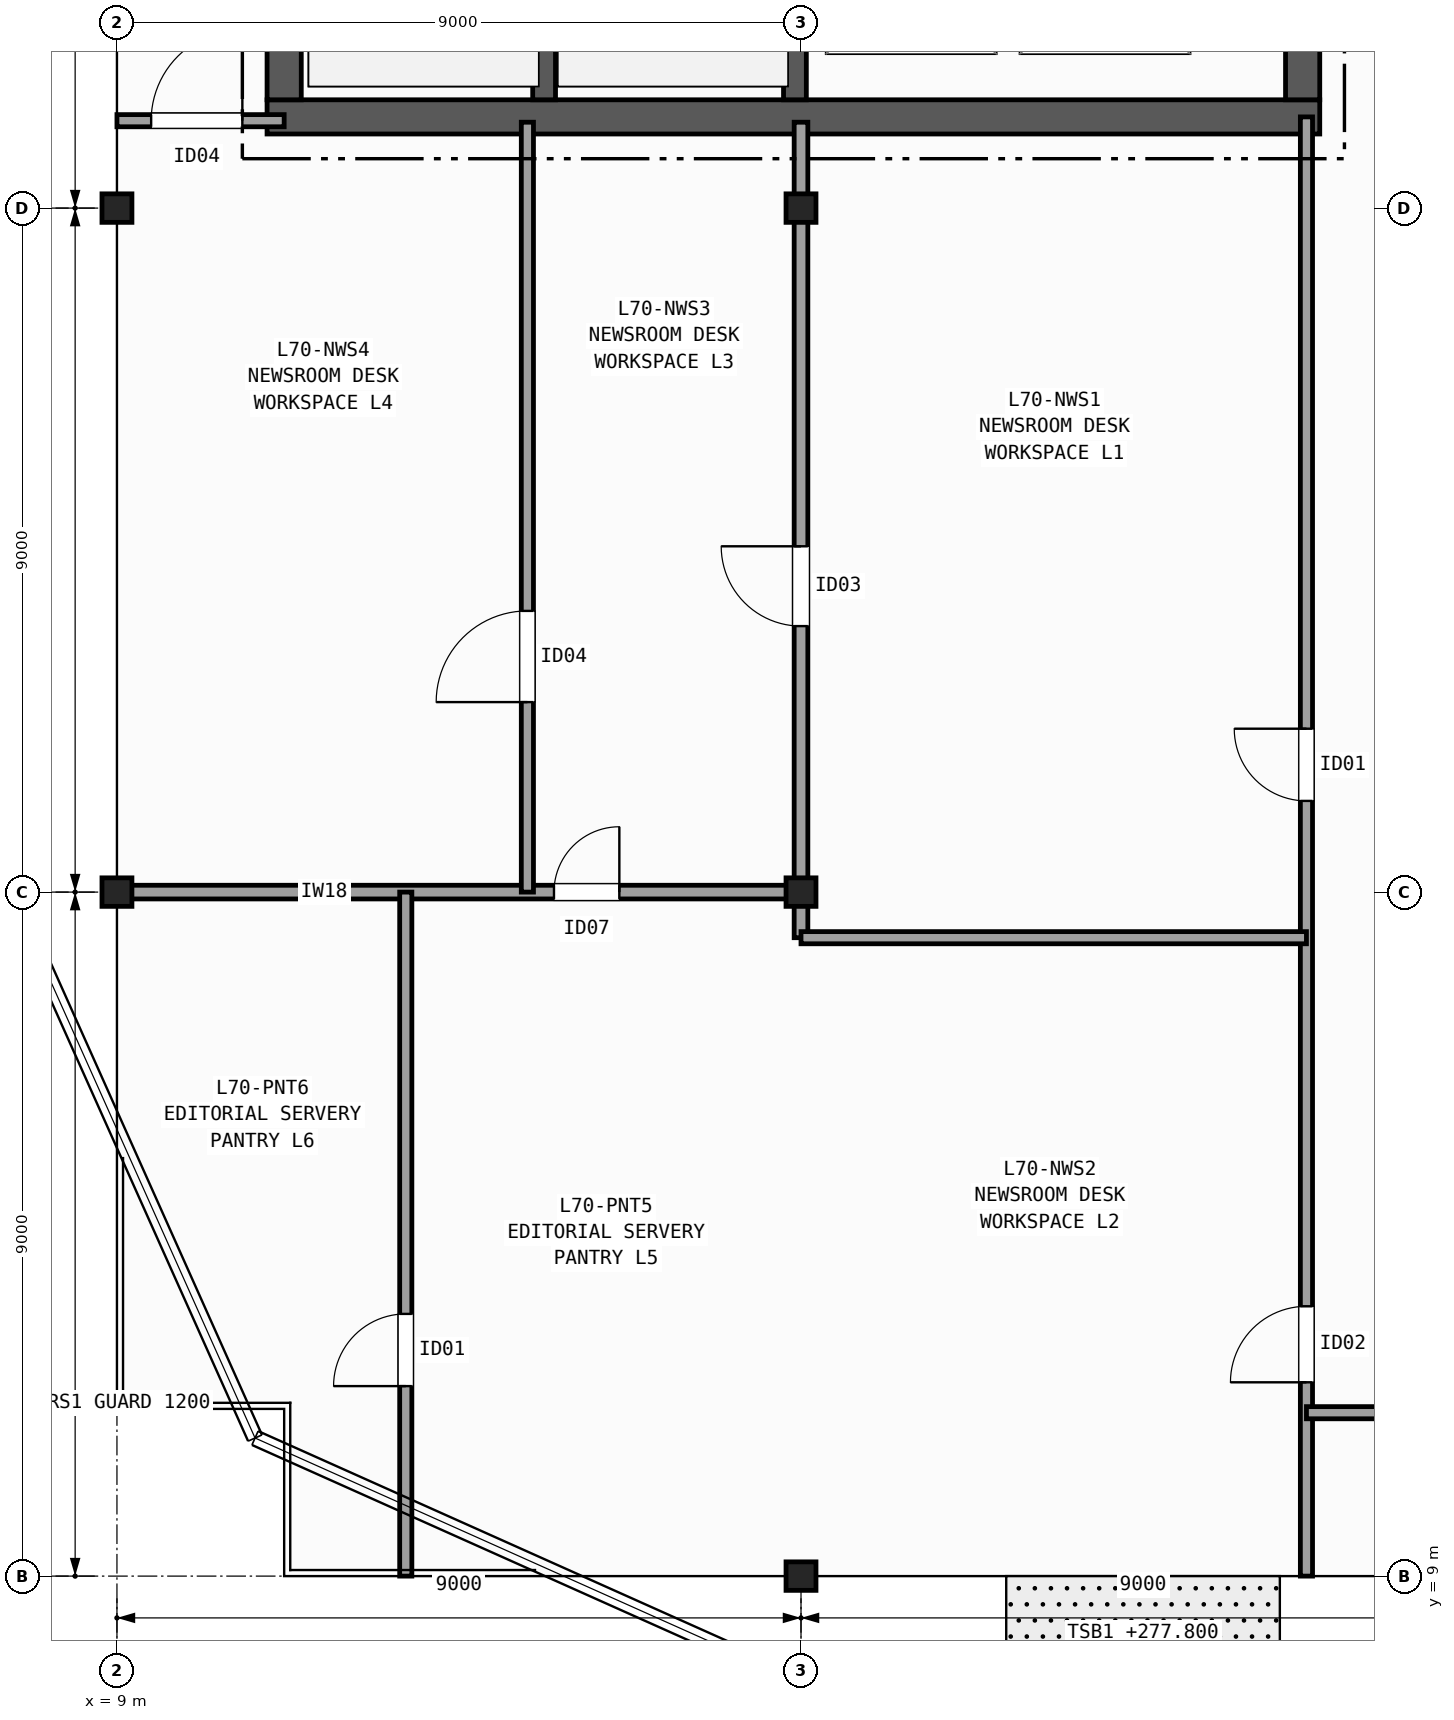
"""IFC4 building model, lengths in metres.
Left out: names, types, materials, properties, quantities, classifications, styles, units other than length and angle.
Written with IfcOpenShell. Run it as: python <this file> out.ifc"""

import sys

from ifc_helpers import new_model, si_unit, direction, frame, frame_2d, origin, origin_2d, place, context, subcontext, project, spatial, rectangle, i_section, extrude, element, fill, save


model = new_model("IFC4")
c1 = context("Model", 3, precision=1e-05, world=origin(), true_north=direction((0.0, 1.0)))
c2 = subcontext(c1, "Body", "Model", "MODEL_VIEW")
j1 = project(units=[si_unit("LENGTHUNIT", "METRE"), si_unit("PLANEANGLEUNIT", "RADIAN")], contexts=[c1])
p1 = place(None, origin())
s1 = spatial("IfcSite", under=j1, at=p1, CompositionType="ELEMENT")
p2 = place(p1, origin())
s2 = spatial("IfcBuilding", under=s1, at=p2, CompositionType="ELEMENT")
p3 = place(p2, frame((0.0, 0.0, 277.8)))
s3 = spatial("IfcBuildingStorey", under=s2, at=p3, CompositionType="ELEMENT", Elevation=277.8)
for number, where, z_axis, x_axis in (
    (1, (9.0, 18.0, 0.0), (0.0, 0.0, 1.0), (1.0, 0.0, 0.0)),
    (2, (9.0, 27.0, 0.0), (0.0, 0.0, 1.0), (1.0, 0.0, 0.0)),
    (3, (18.0, 9.0, 0.0), (0.0, 0.0, 1.0), (1.0, 0.0, 0.0)),
    (4, (18.0, 18.0, 0.0), (0.0, 0.0, 1.0), (1.0, 0.0, 0.0)),
    (5, (18.0, 27.0, 0.0), (0.0, 0.0, 1.0), (1.0, 0.0, 0.0)),
):
    element("IfcColumn", number, at=place(p3, frame(where, z_axis=z_axis, x_axis=x_axis)), inside=s3, PredefinedType="COLUMN", context=c2, shape_type="SweptSolid", body=[
        extrude(i_section(OverallWidth=0.394, OverallDepth=0.375, WebThickness=0.017, FlangeThickness=0.028, FilletRadius=0.015, at=origin_2d()), origin(), (0.0, 0.0, 1.0), 3.7),
    ])
p4 = place(p3, frame((10.975, 28.2, 0.0), z_axis=(0.0, 0.0, 1.0), x_axis=(1.0, 0.0, 0.0)))
e6 = element("IfcWall", 6, at=p4, inside=s3, PredefinedType="SHEAR", context=c2, shape_type="SweptSolid", body=[
    extrude(rectangle(XDim=13.85, YDim=0.45, at=frame_2d((6.925, 0.0))), origin(), (0.0, 0.0, 1.0), 3.42),
])
p5 = place(p3, frame((11.2, 42.175, 0.0), z_axis=(0.0, 0.0, 1.0), x_axis=(0.0, -1.0, 0.0)))
e7 = element("IfcWall", 7, at=p5, inside=s3, PredefinedType="SHEAR", context=c2, shape_type="SweptSolid", body=[
    extrude(rectangle(XDim=13.75, YDim=0.45, at=frame_2d((6.875, 0.0))), origin(), (0.0, 0.0, 1.0), 3.42),
])
p6 = place(p3, frame((24.6, 28.425, 0.0), z_axis=(0.0, 0.0, 1.0), x_axis=(0.0, 1.0, 0.0)))
e8 = element("IfcWall", 8, at=p6, inside=s3, PredefinedType="SHEAR", context=c2, shape_type="SweptSolid", body=[
    extrude(rectangle(XDim=13.75, YDim=0.45, at=frame_2d((6.875, 0.0))), origin(), (0.0, 0.0, 1.0), 3.42),
])
p7 = place(p6, frame((3.375, 0.0, 0.0)))
e9 = element("IfcOpeningElement", 9, at=p7, cuts=e8, PredefinedType="OPENING", context=c2, shape_type="SweptSolid", body=[
    extrude(rectangle(XDim=1.5, YDim=2.2, at=frame_2d((0.75, 1.1))), frame((0.0, 0.235, 0.0), z_axis=(0.0, -1.0, 0.0), x_axis=(1.0, 0.0, 0.0)), (0.0, 0.0, 1.0), 0.47),
])
p8 = place(p6, frame((9.975, 0.0, 0.0)))
e10 = element("IfcOpeningElement", 10, at=p8, cuts=e8, PredefinedType="OPENING", context=c2, shape_type="SweptSolid", body=[
    extrude(rectangle(XDim=0.9, YDim=2.1, at=frame_2d((0.45, 1.05))), frame((0.0, 0.235, 0.0), z_axis=(0.0, -1.0, 0.0), x_axis=(1.0, 0.0, 0.0)), (0.0, 0.0, 1.0), 0.47),
])
p9 = place(p6, frame((12.075, 0.0, 0.0)))
e11 = element("IfcOpeningElement", 11, at=p9, cuts=e8, PredefinedType="OPENING", context=c2, shape_type="SweptSolid", body=[
    extrude(rectangle(XDim=0.9, YDim=2.1, at=frame_2d((0.45, 1.05))), frame((0.0, 0.235, 0.0), z_axis=(0.0, -1.0, 0.0), x_axis=(1.0, 0.0, 0.0)), (0.0, 0.0, 1.0), 0.47),
])
p10 = place(p3, frame((14.62, 28.425, 0.0), z_axis=(0.0, 0.0, 1.0), x_axis=(0.0, 1.0, 0.0)))
e12 = element("IfcWall", 12, at=p10, inside=s3, PredefinedType="SHEAR", context=c2, shape_type="SweptSolid", body=[
    extrude(rectangle(XDim=9.025, YDim=0.3, at=frame_2d((4.512, 0.0))), origin(), (0.0, 0.0, 1.0), 3.42),
])
p11 = place(p3, frame((17.92, 42.175, 0.0), z_axis=(0.0, 0.0, 1.0), x_axis=(0.0, -1.0, 0.0)))
e13 = element("IfcWall", 13, at=p11, inside=s3, PredefinedType="SHEAR", context=c2, shape_type="SweptSolid", body=[
    extrude(rectangle(XDim=13.75, YDim=0.3, at=frame_2d((6.875, 0.0))), origin(), (0.0, 0.0, 1.0), 3.42),
])
p12 = place(p11, frame((2.0, 0.0, 0.0)))
e14 = element("IfcOpeningElement", 14, at=p12, cuts=e13, PredefinedType="OPENING", context=c2, shape_type="SweptSolid", body=[
    extrude(rectangle(XDim=1.15, YDim=2.15, at=frame_2d((0.575, 1.075))), frame((0.0, 0.16, 0.0), z_axis=(0.0, -1.0, 0.0), x_axis=(1.0, 0.0, 0.0)), (0.0, 0.0, 1.0), 0.32),
])
p13 = place(p3, frame((9.0, 28.15, 0.0), z_axis=(0.0, 0.0, 1.0), x_axis=(1.0, 0.0, 0.0)))
e15 = element("IfcWall", 15, at=p13, inside=s3, PredefinedType="PARTITIONING", context=c2, shape_type="SweptSolid", body=[
    extrude(rectangle(XDim=2.2, YDim=0.16, at=frame_2d((1.1, 0.0))), origin(), (0.0, 0.0, 1.0), 2.707),
])
p14 = place(p13, frame((0.45, 0.0, 0.0)))
e16 = element("IfcOpeningElement", 16, at=p14, cuts=e15, PredefinedType="OPENING", context=c2, shape_type="SweptSolid", body=[
    extrude(rectangle(XDim=1.2, YDim=2.15, at=frame_2d((0.6, 1.075))), frame((0.0, 0.09, 0.0), z_axis=(0.0, -1.0, 0.0), x_axis=(1.0, 0.0, 0.0)), (0.0, 0.0, 1.0), 0.18),
])
p15 = place(p3, frame((24.65, 9.0, 0.0), z_axis=(0.0, 0.0, 1.0), x_axis=(0.0, 1.0, 0.0)))
e17 = element("IfcWall", 17, at=p15, inside=s3, PredefinedType="PARTITIONING", context=c2, shape_type="SweptSolid", body=[
    extrude(rectangle(XDim=19.2, YDim=0.16, at=frame_2d((9.6, 0.0))), origin(), (0.0, 0.0, 1.0), 2.707),
])
p16 = place(p15, frame((10.2, 0.0, 0.0)))
e18 = element("IfcOpeningElement", 18, at=p16, cuts=e17, PredefinedType="OPENING", context=c2, shape_type="SweptSolid", body=[
    extrude(rectangle(XDim=0.95, YDim=2.1, at=frame_2d((0.475, 1.05))), frame((0.0, 0.09, 0.0), z_axis=(0.0, -1.0, 0.0), x_axis=(1.0, 0.0, 0.0)), (0.0, 0.0, 1.0), 0.18),
])
p17 = place(p15, frame((2.55, 0.0, 0.0)))
e19 = element("IfcOpeningElement", 19, at=p17, cuts=e17, PredefinedType="OPENING", context=c2, shape_type="SweptSolid", body=[
    extrude(rectangle(XDim=1.0, YDim=2.1, at=frame_2d((0.5, 1.05))), frame((0.0, 0.09, 0.0), z_axis=(0.0, -1.0, 0.0), x_axis=(1.0, 0.0, 0.0)), (0.0, 0.0, 1.0), 0.18),
])
p18 = place(p3, frame((9.0, 18.0, 0.0), z_axis=(0.0, 0.0, 1.0), x_axis=(1.0, 0.0, 0.0)))
e20 = element("IfcWall", 20, at=p18, inside=s3, PredefinedType="PARTITIONING", context=c2, shape_type="SweptSolid", body=[
    extrude(rectangle(XDim=9.08, YDim=0.18, at=frame_2d((4.54, 0.0))), origin(), (0.0, 0.0, 1.0), 2.707),
])
p19 = place(p18, frame((5.75, 0.0, 0.0)))
e21 = element("IfcOpeningElement", 21, at=p19, cuts=e20, PredefinedType="OPENING", context=c2, shape_type="SweptSolid", body=[
    extrude(rectangle(XDim=0.86, YDim=2.05, at=frame_2d((0.43, 1.025))), frame((0.0, 0.1, 0.0), z_axis=(0.0, -1.0, 0.0), x_axis=(1.0, 0.0, 0.0)), (0.0, 0.0, 1.0), 0.2),
])
p20 = place(p3, frame((18.0, 17.4, 0.0), z_axis=(0.0, 0.0, 1.0), x_axis=(0.0, 1.0, 0.0)))
e22 = element("IfcWall", 22, at=p20, inside=s3, PredefinedType="PARTITIONING", context=c2, shape_type="SweptSolid", body=[
    extrude(rectangle(XDim=10.73, YDim=0.18, at=frame_2d((5.365, 0.0))), origin(), (0.0, 0.0, 1.0), 2.789),
])
p21 = place(p20, frame((4.1, 0.0, 0.0)))
e23 = element("IfcOpeningElement", 23, at=p21, cuts=e22, PredefinedType="OPENING", context=c2, shape_type="SweptSolid", body=[
    extrude(rectangle(XDim=1.05, YDim=2.15, at=frame_2d((0.525, 1.075))), frame((0.0, 0.1, 0.0), z_axis=(0.0, -1.0, 0.0), x_axis=(1.0, 0.0, 0.0)), (0.0, 0.0, 1.0), 0.2),
])
p22 = place(p3, frame((18.0, 17.4, 0.0), z_axis=(0.0, 0.0, 1.0), x_axis=(1.0, 0.0, 0.0)))
e24 = element("IfcWall", 24, at=p22, inside=s3, PredefinedType="PARTITIONING", context=c2, shape_type="SweptSolid", body=[
    extrude(rectangle(XDim=6.65, YDim=0.16, at=frame_2d((3.325, 0.0))), origin(), (0.0, 0.0, 1.0), 2.792),
])
p23 = place(p3, frame((14.4, 18.0, 0.0), z_axis=(0.0, 0.0, 1.0), x_axis=(0.0, 1.0, 0.0)))
e25 = element("IfcWall", 25, at=p23, inside=s3, PredefinedType="PARTITIONING", context=c2, shape_type="SweptSolid", body=[
    extrude(rectangle(XDim=10.13, YDim=0.16, at=frame_2d((5.065, 0.0))), origin(), (0.0, 0.0, 1.0), 2.789),
])
p24 = place(p23, frame((2.5, 0.0, 0.0)))
e26 = element("IfcOpeningElement", 26, at=p24, cuts=e25, PredefinedType="OPENING", context=c2, shape_type="SweptSolid", body=[
    extrude(rectangle(XDim=1.2, YDim=2.15, at=frame_2d((0.6, 1.075))), frame((0.0, 0.09, 0.0), z_axis=(0.0, -1.0, 0.0), x_axis=(1.0, 0.0, 0.0)), (0.0, 0.0, 1.0), 0.18),
])
p25 = place(p3, frame((12.8, 9.0, 0.0), z_axis=(0.0, 0.0, 1.0), x_axis=(0.0, 1.0, 0.0)))
e27 = element("IfcWall", 27, at=p25, inside=s3, PredefinedType="PARTITIONING", context=c2, shape_type="SweptSolid", body=[
    extrude(rectangle(XDim=9.0, YDim=0.16, at=frame_2d((4.5, 0.0))), origin(), (0.0, 0.0, 1.0), 2.789),
])
p26 = place(p25, frame((2.5, 0.0, 0.0)))
e28 = element("IfcOpeningElement", 28, at=p26, cuts=e27, PredefinedType="OPENING", context=c2, shape_type="SweptSolid", body=[
    extrude(rectangle(XDim=0.95, YDim=2.1, at=frame_2d((0.475, 1.05))), frame((0.0, 0.09, 0.0), z_axis=(0.0, -1.0, 0.0), x_axis=(1.0, 0.0, 0.0)), (0.0, 0.0, 1.0), 0.18),
])
p27 = place(p3, frame((24.65, 11.15, 0.0), z_axis=(0.0, 0.0, 1.0), x_axis=(1.0, 0.0, 0.0)))
e29 = element("IfcWall", 29, at=p27, inside=s3, PredefinedType="PARTITIONING", context=c2, shape_type="SweptSolid", body=[
    extrude(rectangle(XDim=4.75, YDim=0.16, at=frame_2d((2.375, 0.0))), origin(), (0.0, 0.0, 1.0), 2.792),
])
p28 = place(p27, frame((1.2, 0.0, 0.0)))
e30 = element("IfcOpeningElement", 30, at=p28, cuts=e29, PredefinedType="OPENING", context=c2, shape_type="SweptSolid", body=[
    extrude(rectangle(XDim=1.0, YDim=2.1, at=frame_2d((0.5, 1.05))), frame((0.0, 0.09, 0.0), z_axis=(0.0, -1.0, 0.0), x_axis=(1.0, 0.0, 0.0)), (0.0, 0.0, 1.0), 0.18),
])
p29 = place(p14, origin())
e31 = element("IfcDoor", 31, at=p29, inside=s3, OperationType="SINGLE_SWING_RIGHT", PredefinedType="DOOR", context=c2, shape_type="SweptSolid", body=[
    extrude(rectangle(XDim=1.2, YDim=2.15, at=frame_2d((0.6, 1.075))), frame((0.0, 0.025, 0.0), z_axis=(0.0, -1.0, 0.0), x_axis=(1.0, 0.0, 0.0)), (0.0, 0.0, 1.0), 0.05),
])
fill(e16, e31)
p30 = place(p16, origin())
e32 = element("IfcDoor", 32, at=p30, inside=s3, OperationType="SINGLE_SWING_RIGHT", PredefinedType="DOOR", context=c2, shape_type="SweptSolid", body=[
    extrude(rectangle(XDim=0.95, YDim=2.1, at=frame_2d((0.475, 1.05))), frame((0.0, 0.025, 0.0), z_axis=(0.0, -1.0, 0.0), x_axis=(1.0, 0.0, 0.0)), (0.0, 0.0, 1.0), 0.05),
])
fill(e18, e32)
p31 = place(p17, origin())
e33 = element("IfcDoor", 33, at=p31, inside=s3, OperationType="SINGLE_SWING_LEFT", PredefinedType="DOOR", context=c2, shape_type="SweptSolid", body=[
    extrude(rectangle(XDim=1.0, YDim=2.1, at=frame_2d((0.5, 1.05))), frame((0.0, 0.025, 0.0), z_axis=(0.0, -1.0, 0.0), x_axis=(1.0, 0.0, 0.0)), (0.0, 0.0, 1.0), 0.05),
])
fill(e19, e33)
p32 = place(p21, origin())
e34 = element("IfcDoor", 34, at=p32, inside=s3, OperationType="SINGLE_SWING_RIGHT", PredefinedType="DOOR", context=c2, shape_type="SweptSolid", body=[
    extrude(rectangle(XDim=1.05, YDim=2.15, at=frame_2d((0.525, 1.075))), frame((0.0, 0.025, 0.0), z_axis=(0.0, -1.0, 0.0), x_axis=(1.0, 0.0, 0.0)), (0.0, 0.0, 1.0), 0.05),
])
fill(e23, e34)
p33 = place(p24, origin())
e35 = element("IfcDoor", 35, at=p33, inside=s3, OperationType="SINGLE_SWING_LEFT", PredefinedType="DOOR", context=c2, shape_type="SweptSolid", body=[
    extrude(rectangle(XDim=1.2, YDim=2.15, at=frame_2d((0.6, 1.075))), frame((0.0, 0.025, 0.0), z_axis=(0.0, -1.0, 0.0), x_axis=(1.0, 0.0, 0.0)), (0.0, 0.0, 1.0), 0.05),
])
fill(e26, e35)
p34 = place(p19, origin())
e36 = element("IfcDoor", 36, at=p34, inside=s3, OperationType="SINGLE_SWING_RIGHT", PredefinedType="DOOR", context=c2, shape_type="SweptSolid", body=[
    extrude(rectangle(XDim=0.86, YDim=2.05, at=frame_2d((0.43, 1.025))), frame((0.0, 0.025, 0.0), z_axis=(0.0, -1.0, 0.0), x_axis=(1.0, 0.0, 0.0)), (0.0, 0.0, 1.0), 0.05),
])
fill(e21, e36)
p35 = place(p26, origin())
e37 = element("IfcDoor", 37, at=p35, inside=s3, OperationType="SINGLE_SWING_LEFT", PredefinedType="DOOR", context=c2, shape_type="SweptSolid", body=[
    extrude(rectangle(XDim=0.95, YDim=2.1, at=frame_2d((0.475, 1.05))), frame((0.0, 0.025, 0.0), z_axis=(0.0, -1.0, 0.0), x_axis=(1.0, 0.0, 0.0)), (0.0, 0.0, 1.0), 0.05),
])
fill(e28, e37)
save(model, sys.argv[1])
